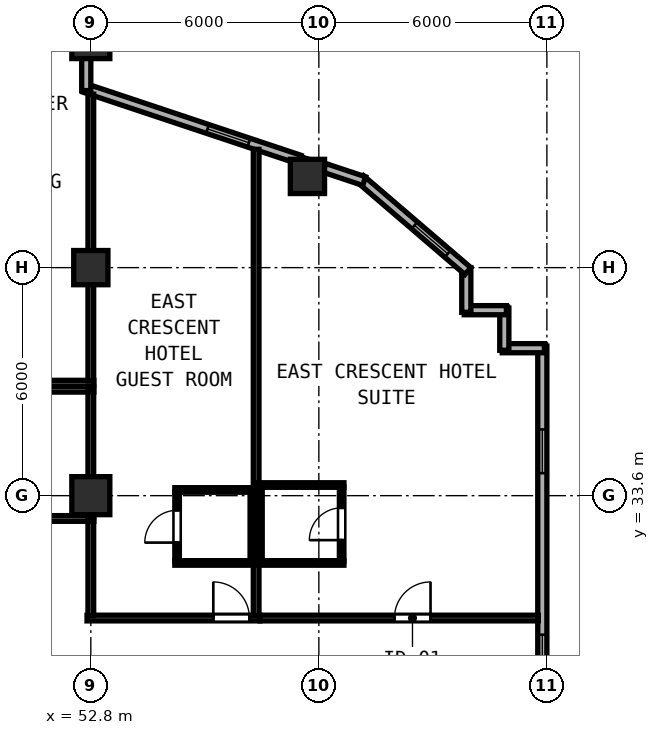
"""IFC4 building model, lengths in metres.
Left out: names, types, materials, properties, quantities, classifications, styles, units other than length and angle.
Written with IfcOpenShell. Run it as: python <this file> out.ifc"""

import sys

from ifc_helpers import new_model, si_unit, direction, frame, frame_2d, origin, origin_2d, place, context, subcontext, project, spatial, rectangle, hollow_rectangle, extrude, element, fill, save


model = new_model("IFC4")
c1 = context("Model", 3, precision=1e-05, world=origin(), true_north=direction((0.0, 1.0)))
c2 = subcontext(c1, "Body", "Model", "MODEL_VIEW")
j1 = project(units=[si_unit("LENGTHUNIT", "METRE"), si_unit("PLANEANGLEUNIT", "RADIAN")], contexts=[c1])
p1 = place(None, origin())
s1 = spatial("IfcSite", under=j1, at=p1, CompositionType="ELEMENT")
p2 = place(p1, origin())
s2 = spatial("IfcBuilding", under=s1, at=p2, CompositionType="ELEMENT")
p3 = place(p2, frame((0.0, 0.0, 128.8)))
s3 = spatial("IfcBuildingStorey", under=s2, at=p3, CompositionType="ELEMENT", Elevation=128.8)
for number, where, z_axis, x_axis in (
    (1, (52.8, 33.6, 0.0), (0.0, 0.0, 1.0), (1.0, 0.0, 0.0)),
    (2, (52.8, 45.6, 0.0), (0.0, 0.0, 1.0), (1.0, 0.0, 0.0)),
):
    element("IfcColumn", number, at=place(p3, frame(where, z_axis=z_axis, x_axis=x_axis)), inside=s3, PredefinedType="COLUMN", context=c2, shape_type="SweptSolid", body=[
        extrude(hollow_rectangle(XDim=1.0, YDim=1.0, WallThickness=0.038, at=origin_2d()), origin(), (0.0, 0.0, 1.0), 3.8),
    ])
for number, where, z_axis, x_axis in (
    (3, (52.8, 39.6, 0.0), (0.0, 0.0, 1.0), (1.0, 0.0, 0.0)),
    (4, (58.5, 42.0, 0.0), (0.0, 0.0, 1.0), (1.0, 0.0, 0.0)),
):
    element("IfcColumn", number, at=place(p3, frame(where, z_axis=z_axis, x_axis=x_axis)), inside=s3, PredefinedType="COLUMN", context=c2, shape_type="SweptSolid", body=[
        extrude(hollow_rectangle(XDim=0.9, YDim=0.9, WallThickness=0.034, at=origin_2d()), origin(), (0.0, 0.0, 1.0), 3.8),
    ])
p4 = place(p3, frame((64.68, 28.092, 0.0), z_axis=(0.0, 0.0, 1.0), x_axis=(0.0, 1.0, 0.0)))
e5 = element("IfcWall", 5, at=p4, inside=s3, PredefinedType="SOLIDWALL", context=c2, shape_type="SweptSolid", body=[
    extrude(rectangle(XDim=9.443, YDim=0.24, at=frame_2d((4.721, 0.0))), origin(), (0.0, 0.0, 1.0), 3.6),
])
p5 = place(p4, frame((0.7, 0.0, 0.85)))
e6 = element("IfcOpeningElement", 6, at=p5, cuts=e5, PredefinedType="OPENING", context=c2, shape_type="SweptSolid", body=[
    extrude(rectangle(XDim=1.15, YDim=1.8, at=frame_2d((0.575, 0.9))), frame((0.0, 0.13, 0.0), z_axis=(0.0, -1.0, 0.0), x_axis=(1.0, 0.0, 0.0)), (0.0, 0.0, 1.0), 0.26),
])
p6 = place(p4, frame((6.1, 0.0, 0.85)))
e7 = element("IfcOpeningElement", 7, at=p6, cuts=e5, PredefinedType="OPENING", context=c2, shape_type="SweptSolid", body=[
    extrude(rectangle(XDim=1.15, YDim=1.8, at=frame_2d((0.575, 0.9))), frame((0.0, 0.13, 0.0), z_axis=(0.0, -1.0, 0.0), x_axis=(1.0, 0.0, 0.0)), (0.0, 0.0, 1.0), 0.26),
])
p7 = place(p3, frame((64.735, 37.48, 0.0), z_axis=(0.0, 0.0, 1.0), x_axis=(-1.0, 0.0, 0.0)))
e8 = element("IfcWall", 8, at=p7, inside=s3, PredefinedType="SOLIDWALL", context=c2, shape_type="SweptSolid", body=[
    extrude(rectangle(XDim=1.11, YDim=0.24, at=frame_2d((0.555, 0.0))), origin(), (0.0, 0.0, 1.0), 3.6),
])
p8 = place(p3, frame((63.68, 37.425, 0.0), z_axis=(0.0, 0.0, 1.0), x_axis=(0.0, 1.0, 0.0)))
e9 = element("IfcWall", 9, at=p8, inside=s3, PredefinedType="SOLIDWALL", context=c2, shape_type="SweptSolid", body=[
    extrude(rectangle(XDim=1.11, YDim=0.24, at=frame_2d((0.555, 0.0))), origin(), (0.0, 0.0, 1.0), 3.6),
])
p9 = place(p3, frame((63.735, 38.48, 0.0), z_axis=(0.0, 0.0, 1.0), x_axis=(-1.0, 0.0, 0.0)))
e10 = element("IfcWall", 10, at=p9, inside=s3, PredefinedType="SOLIDWALL", context=c2, shape_type="SweptSolid", body=[
    extrude(rectangle(XDim=1.11, YDim=0.24, at=frame_2d((0.555, 0.0))), origin(), (0.0, 0.0, 1.0), 3.6),
])
p10 = place(p3, frame((62.68, 38.425, 0.0), z_axis=(0.0, 0.0, 1.0), x_axis=(0.0, 1.0, 0.0)))
e11 = element("IfcWall", 11, at=p10, inside=s3, PredefinedType="SOLIDWALL", context=c2, shape_type="SweptSolid", body=[
    extrude(rectangle(XDim=1.175, YDim=0.24, at=frame_2d((0.587, 0.0))), origin(), (0.0, 0.0, 1.0), 3.6),
])
p11 = place(p3, frame((62.722, 39.509, 0.0), z_axis=(0.0, 0.0, 1.0), x_axis=(-0.759247334792, 0.650802185469, 0.0)))
e12 = element("IfcWall", 12, at=p11, inside=s3, PredefinedType="SOLIDWALL", context=c2, shape_type="SweptSolid", body=[
    extrude(rectangle(XDim=3.719, YDim=0.24, at=frame_2d((1.86, 0.0))), origin(), (0.0, 0.0, 1.0), 3.6),
])
p12 = place(p11, frame((0.7, 0.0, 0.85)))
e13 = element("IfcOpeningElement", 13, at=p12, cuts=e12, PredefinedType="OPENING", context=c2, shape_type="SweptSolid", body=[
    extrude(rectangle(XDim=1.15, YDim=1.8, at=frame_2d((0.575, 0.9))), frame((0.0, 0.13, 0.0), z_axis=(0.0, -1.0, 0.0), x_axis=(1.0, 0.0, 0.0)), (0.0, 0.0, 1.0), 0.26),
])
p13 = place(p3, frame((59.992, 41.876, 0.0), z_axis=(0.0, 0.0, 1.0), x_axis=(-0.948661238983, 0.316293935527, 0.0)))
e14 = element("IfcWall", 14, at=p13, inside=s3, PredefinedType="SOLIDWALL", context=c2, shape_type="SweptSolid", body=[
    extrude(rectangle(XDim=1.107, YDim=0.24, at=frame_2d((0.553, 0.0))), origin(), (0.0, 0.0, 1.0), 3.6),
])
p14 = place(p3, frame((58.295, 42.442, 0.0), z_axis=(0.0, 0.0, 1.0), x_axis=(-0.948687385027, 0.316215504823, 0.0)))
e15 = element("IfcWall", 15, at=p14, inside=s3, PredefinedType="SOLIDWALL", context=c2, shape_type="SweptSolid", body=[
    extrude(rectangle(XDim=5.973, YDim=0.24, at=frame_2d((2.987, 0.0))), origin(), (0.0, 0.0, 1.0), 3.145),
])
p15 = place(p14, frame((1.406, 0.0, 0.85)))
e16 = element("IfcOpeningElement", 16, at=p15, cuts=e15, PredefinedType="OPENING", context=c2, shape_type="SweptSolid", body=[
    extrude(rectangle(XDim=1.15, YDim=1.8, at=frame_2d((0.575, 0.9))), frame((0.0, 0.13, 0.0), z_axis=(0.0, -1.0, 0.0), x_axis=(1.0, 0.0, 0.0)), (0.0, 0.0, 1.0), 0.26),
])
p16 = place(p3, frame((52.68, 44.259, 0.0), z_axis=(0.0, 0.0, 1.0), x_axis=(0.0, 1.0, 0.0)))
e17 = element("IfcWall", 17, at=p16, inside=s3, PredefinedType="SOLIDWALL", context=c2, shape_type="SweptSolid", body=[
    extrude(rectangle(XDim=0.849, YDim=0.24, at=frame_2d((0.425, 0.0))), origin(), (0.0, 0.0, 1.0), 3.145),
])
for number, where, z_axis, x_axis in (
    (18, (49.08, 36.4, 0.0), (0.0, 0.0, 1.0), (1.0, 0.0, 0.0)),
    (19, (49.08, 33.0, 0.0), (0.0, 0.0, 1.0), (1.0, 0.0, 0.0)),
):
    element("IfcWall", number, at=place(p3, frame(where, z_axis=z_axis, x_axis=x_axis)), inside=s3, PredefinedType="PARTITIONING", context=c2, shape_type="SweptSolid", body=[
        extrude(rectangle(XDim=3.8, YDim=0.15, at=frame_2d((1.9, 0.0))), origin(), (0.0, 0.0, 1.0), 3.6),
    ])
p17 = place(p3, frame((52.8, 33.06, 0.0), z_axis=(0.0, 0.0, 1.0), x_axis=(0.0, 1.0, 0.0)))
e20 = element("IfcWall", 20, at=p17, inside=s3, PredefinedType="PARTITIONING", context=c2, shape_type="SweptSolid", body=[
    extrude(rectangle(XDim=3.28, YDim=0.15, at=frame_2d((1.64, 0.0))), origin(), (0.0, 0.0, 1.0), 3.145),
])
p18 = place(p3, frame((49.08, 36.56, 0.0), z_axis=(0.0, 0.0, 1.0), x_axis=(1.0, 0.0, 0.0)))
e21 = element("IfcWall", 21, at=p18, inside=s3, PredefinedType="PARTITIONING", context=c2, shape_type="SweptSolid", body=[
    extrude(rectangle(XDim=3.8, YDim=0.15, at=frame_2d((1.9, 0.0))), origin(), (0.0, 0.0, 1.0), 3.6),
])
p19 = place(p3, frame((52.8, 36.62, 0.0), z_axis=(0.0, 0.0, 1.0), x_axis=(0.0, 1.0, 0.0)))
e22 = element("IfcWall", 22, at=p19, inside=s3, PredefinedType="PARTITIONING", context=c2, shape_type="SweptSolid", body=[
    extrude(rectangle(XDim=7.543, YDim=0.15, at=frame_2d((3.771, 0.0))), origin(), (0.0, 0.0, 1.0), 3.145),
])
p20 = place(p3, frame((52.7, 30.38, 0.0), z_axis=(0.0, 0.0, 1.0), x_axis=(1.0, 0.0, 0.0)))
e23 = element("IfcWall", 23, at=p20, inside=s3, PredefinedType="PARTITIONING", context=c2, shape_type="SweptSolid", body=[
    extrude(rectangle(XDim=4.55, YDim=0.15, at=frame_2d((2.275, 0.0))), origin(), (0.0, 0.0, 1.0), 3.6),
])
p21 = place(p20, frame((3.323, 0.0, 0.0)))
e24 = element("IfcOpeningElement", 24, at=p21, cuts=e23, PredefinedType="OPENING", context=c2, shape_type="SweptSolid", body=[
    extrude(rectangle(XDim=0.95, YDim=2.15, at=frame_2d((0.475, 1.075))), frame((0.0, 0.085, 0.0), z_axis=(0.0, -1.0, 0.0), x_axis=(1.0, 0.0, 0.0)), (0.0, 0.0, 1.0), 0.17),
])
p22 = place(p3, frame((52.8, 30.44, 0.0), z_axis=(0.0, 0.0, 1.0), x_axis=(0.0, 1.0, 0.0)))
e25 = element("IfcWall", 25, at=p22, inside=s3, PredefinedType="PARTITIONING", context=c2, shape_type="SweptSolid", body=[
    extrude(rectangle(XDim=2.5, YDim=0.15, at=frame_2d((1.25, 0.0))), origin(), (0.0, 0.0, 1.0), 3.145),
])
p23 = place(p3, frame((57.15, 30.44, 0.0), z_axis=(0.0, 0.0, 1.0), x_axis=(0.0, 1.0, 0.0)))
e26 = element("IfcWall", 26, at=p23, inside=s3, PredefinedType="PARTITIONING", context=c2, shape_type="SweptSolid", body=[
    extrude(rectangle(XDim=12.273, YDim=0.15, at=frame_2d((6.136, 0.0))), origin(), (0.0, 0.0, 1.0), 3.6),
])
for number, where, z_axis, x_axis in (
    (27, (55.01, 33.75, 0.0), (0.0, 0.0, 1.0), (1.0, 0.0, 0.0)),
    (28, (55.01, 31.83, 0.0), (0.0, 0.0, 1.0), (1.0, 0.0, 0.0)),
):
    element("IfcWall", number, at=place(p3, frame(where, z_axis=z_axis, x_axis=x_axis)), inside=s3, PredefinedType="PARTITIONING", context=c2, shape_type="SweptSolid", body=[
        extrude(rectangle(XDim=2.08, YDim=0.12, at=frame_2d((1.04, 0.0))), origin(), (0.0, 0.0, 1.0), 3.6),
    ])
p24 = place(p3, frame((55.07, 31.875, 0.0), z_axis=(0.0, 0.0, 1.0), x_axis=(0.0, 1.0, 0.0)))
e29 = element("IfcWall", 29, at=p24, inside=s3, PredefinedType="PARTITIONING", context=c2, shape_type="SweptSolid", body=[
    extrude(rectangle(XDim=1.83, YDim=0.12, at=frame_2d((0.915, 0.0))), origin(), (0.0, 0.0, 1.0), 3.6),
])
p25 = place(p24, frame((1.34, 0.0, 0.0), z_axis=(0.0, 0.0, 1.0), x_axis=(-1.0, 0.0, 0.0)))
e30 = element("IfcOpeningElement", 30, at=p25, cuts=e29, PredefinedType="OPENING", context=c2, shape_type="SweptSolid", body=[
    extrude(rectangle(XDim=0.85, YDim=2.1, at=frame_2d((0.425, 1.05))), frame((0.0, 0.07, 0.0), z_axis=(0.0, -1.0, 0.0), x_axis=(1.0, 0.0, 0.0)), (0.0, 0.0, 1.0), 0.14),
])
p26 = place(p3, frame((57.05, 31.875, 0.0), z_axis=(0.0, 0.0, 1.0), x_axis=(0.0, 1.0, 0.0)))
e31 = element("IfcWall", 31, at=p26, inside=s3, PredefinedType="PARTITIONING", context=c2, shape_type="SweptSolid", body=[
    extrude(rectangle(XDim=1.83, YDim=0.12, at=frame_2d((0.915, 0.0))), origin(), (0.0, 0.0, 1.0), 3.6),
])
p27 = place(p3, frame((57.252, 30.38, 0.0), z_axis=(0.0, 0.0, 1.0), x_axis=(1.0, 0.0, 0.0)))
e32 = element("IfcWall", 32, at=p27, inside=s3, PredefinedType="PARTITIONING", context=c2, shape_type="SweptSolid", body=[
    extrude(rectangle(XDim=7.323, YDim=0.15, at=frame_2d((3.662, 0.0))), origin(), (0.0, 0.0, 1.0), 3.6),
])
p28 = place(p27, frame((3.537, 0.0, 0.0)))
e33 = element("IfcOpeningElement", 33, at=p28, cuts=e32, PredefinedType="OPENING", context=c2, shape_type="SweptSolid", body=[
    extrude(rectangle(XDim=0.95, YDim=2.18, at=frame_2d((0.475, 1.09))), frame((0.0, 0.085, 0.0), z_axis=(0.0, -1.0, 0.0), x_axis=(1.0, 0.0, 0.0)), (0.0, 0.0, 1.0), 0.17),
])
for number, where, z_axis, x_axis in (
    (34, (57.21, 33.88, 0.0), (0.0, 0.0, 1.0), (1.0, 0.0, 0.0)),
    (35, (57.21, 31.83, 0.0), (0.0, 0.0, 1.0), (1.0, 0.0, 0.0)),
):
    element("IfcWall", number, at=place(p3, frame(where, z_axis=z_axis, x_axis=x_axis)), inside=s3, PredefinedType="PARTITIONING", context=c2, shape_type="SweptSolid", body=[
        extrude(rectangle(XDim=2.25, YDim=0.12, at=frame_2d((1.125, 0.0))), origin(), (0.0, 0.0, 1.0), 3.6),
    ])
p29 = place(p3, frame((57.25, 31.875, 0.0), z_axis=(0.0, 0.0, 1.0), x_axis=(0.0, 1.0, 0.0)))
e36 = element("IfcWall", 36, at=p29, inside=s3, PredefinedType="PARTITIONING", context=c2, shape_type="SweptSolid", body=[
    extrude(rectangle(XDim=1.96, YDim=0.12, at=frame_2d((0.98, 0.0))), origin(), (0.0, 0.0, 1.0), 3.6),
])
p30 = place(p3, frame((59.4, 31.875, 0.0), z_axis=(0.0, 0.0, 1.0), x_axis=(0.0, 1.0, 0.0)))
e37 = element("IfcWall", 37, at=p30, inside=s3, PredefinedType="PARTITIONING", context=c2, shape_type="SweptSolid", body=[
    extrude(rectangle(XDim=1.96, YDim=0.12, at=frame_2d((0.98, 0.0))), origin(), (0.0, 0.0, 1.0), 3.6),
])
p31 = place(p30, frame((0.555, 0.0, 0.0)))
e38 = element("IfcOpeningElement", 38, at=p31, cuts=e37, PredefinedType="OPENING", context=c2, shape_type="SweptSolid", body=[
    extrude(rectangle(XDim=0.85, YDim=2.1, at=frame_2d((0.425, 1.05))), frame((0.0, 0.07, 0.0), z_axis=(0.0, -1.0, 0.0), x_axis=(1.0, 0.0, 0.0)), (0.0, 0.0, 1.0), 0.14),
])
p32 = place(p5, origin())
e39 = element("IfcWindow", 39, at=p32, inside=s3, PartitioningType="SINGLE_PANEL", PredefinedType="WINDOW", context=c2, shape_type="SweptSolid", body=[
    extrude(rectangle(XDim=1.15, YDim=1.8, at=frame_2d((0.575, 0.9))), frame((0.0, 0.03, 0.0), z_axis=(0.0, -1.0, 0.0), x_axis=(1.0, 0.0, 0.0)), (0.0, 0.0, 1.0), 0.06),
])
fill(e6, e39)
p33 = place(p6, origin())
e40 = element("IfcWindow", 40, at=p33, inside=s3, PartitioningType="SINGLE_PANEL", PredefinedType="WINDOW", context=c2, shape_type="SweptSolid", body=[
    extrude(rectangle(XDim=1.15, YDim=1.8, at=frame_2d((0.575, 0.9))), frame((0.0, 0.03, 0.0), z_axis=(0.0, -1.0, 0.0), x_axis=(1.0, 0.0, 0.0)), (0.0, 0.0, 1.0), 0.06),
])
fill(e7, e40)
p34 = place(p12, origin())
e41 = element("IfcWindow", 41, at=p34, inside=s3, PartitioningType="SINGLE_PANEL", PredefinedType="WINDOW", context=c2, shape_type="SweptSolid", body=[
    extrude(rectangle(XDim=1.15, YDim=1.8, at=frame_2d((0.575, 0.9))), frame((0.0, 0.03, 0.0), z_axis=(0.0, -1.0, 0.0), x_axis=(1.0, 0.0, 0.0)), (0.0, 0.0, 1.0), 0.06),
])
fill(e13, e41)
p35 = place(p15, origin())
e42 = element("IfcWindow", 42, at=p35, inside=s3, PartitioningType="SINGLE_PANEL", PredefinedType="WINDOW", context=c2, shape_type="SweptSolid", body=[
    extrude(rectangle(XDim=1.15, YDim=1.8, at=frame_2d((0.575, 0.9))), frame((0.0, 0.03, 0.0), z_axis=(0.0, -1.0, 0.0), x_axis=(1.0, 0.0, 0.0)), (0.0, 0.0, 1.0), 0.06),
])
fill(e16, e42)
p36 = place(p21, origin())
e43 = element("IfcDoor", 43, at=p36, inside=s3, OperationType="SINGLE_SWING_LEFT", PredefinedType="DOOR", context=c2, shape_type="SweptSolid", body=[
    extrude(rectangle(XDim=0.95, YDim=2.15, at=frame_2d((0.475, 1.075))), frame((0.0, 0.025, 0.0), z_axis=(0.0, -1.0, 0.0), x_axis=(1.0, 0.0, 0.0)), (0.0, 0.0, 1.0), 0.05),
])
fill(e24, e43)
p37 = place(p25, origin())
e44 = element("IfcDoor", 44, at=p37, inside=s3, OperationType="SINGLE_SWING_RIGHT", PredefinedType="DOOR", context=c2, shape_type="SweptSolid", body=[
    extrude(rectangle(XDim=0.85, YDim=2.1, at=frame_2d((0.425, 1.05))), frame((0.0, 0.025, 0.0), z_axis=(0.0, -1.0, 0.0), x_axis=(1.0, 0.0, 0.0)), (0.0, 0.0, 1.0), 0.05),
])
fill(e30, e44)
p38 = place(p28, origin())
e45 = element("IfcDoor", 45, at=p38, inside=s3, OperationType="SINGLE_SWING_RIGHT", PredefinedType="DOOR", context=c2, shape_type="SweptSolid", body=[
    extrude(rectangle(XDim=0.95, YDim=2.18, at=frame_2d((0.475, 1.09))), frame((0.0, 0.025, 0.0), z_axis=(0.0, -1.0, 0.0), x_axis=(1.0, 0.0, 0.0)), (0.0, 0.0, 1.0), 0.05),
])
fill(e33, e45)
p39 = place(p31, origin())
e46 = element("IfcDoor", 46, at=p39, inside=s3, OperationType="SINGLE_SWING_LEFT", PredefinedType="DOOR", context=c2, shape_type="SweptSolid", body=[
    extrude(rectangle(XDim=0.85, YDim=2.1, at=frame_2d((0.425, 1.05))), frame((0.0, 0.025, 0.0), z_axis=(0.0, -1.0, 0.0), x_axis=(1.0, 0.0, 0.0)), (0.0, 0.0, 1.0), 0.05),
])
fill(e38, e46)
save(model, sys.argv[1])
